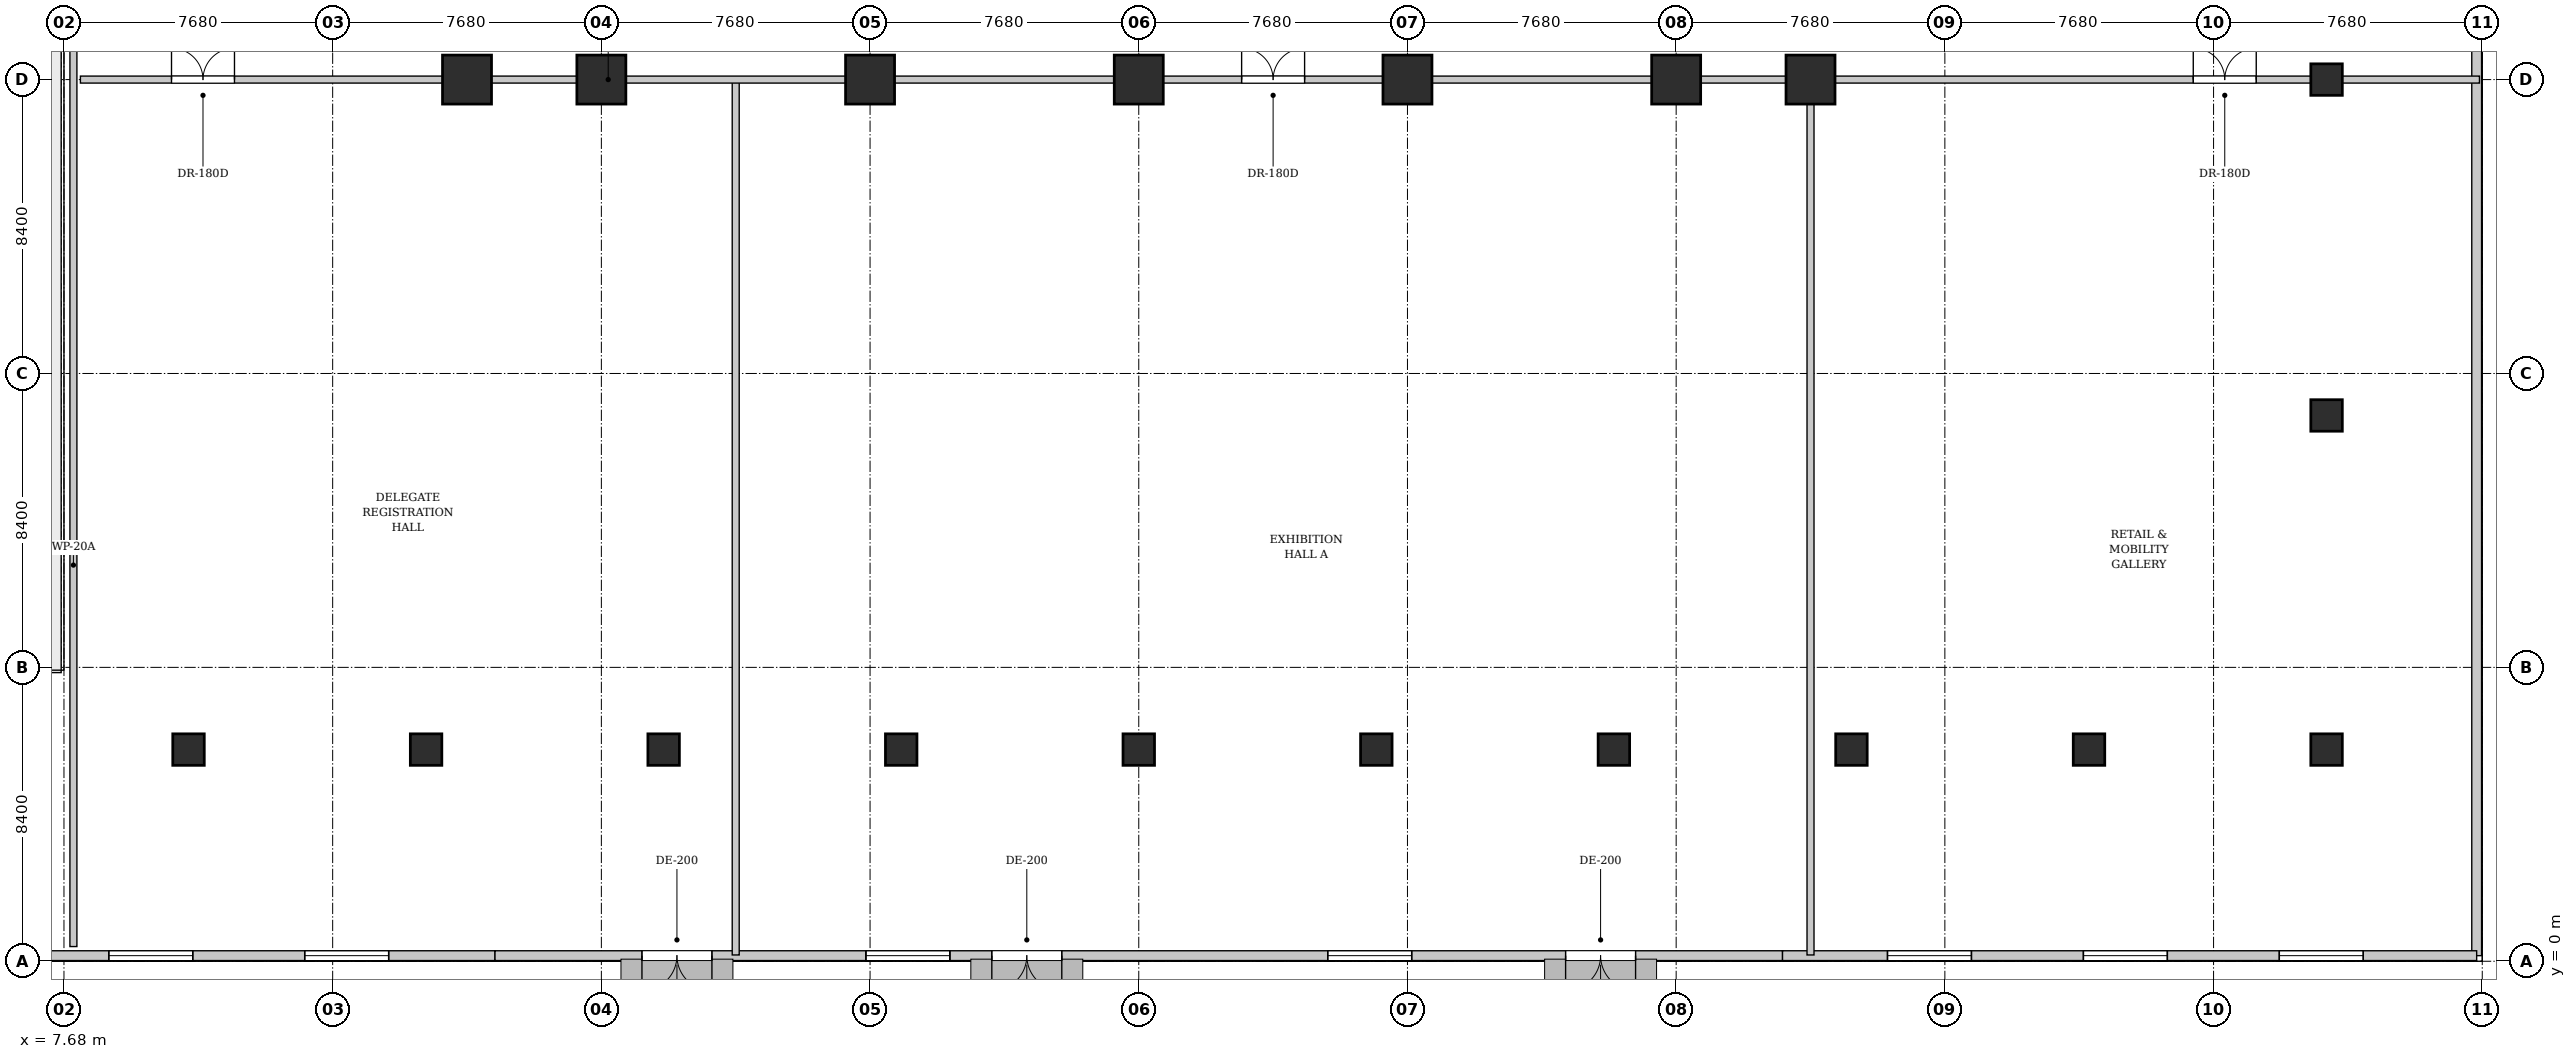
"""IFC4 building model, lengths in metres.
Left out: names, types, materials, properties, quantities, classifications, styles, units other than length and angle.
Written with IfcOpenShell. Run it as: python <this file> out.ifc"""

import sys

from ifc_helpers import new_model, si_unit, direction, frame, frame_2d, origin, origin_2d, place, context, subcontext, project, spatial, rectangle, extrude, element, fill, save


model = new_model("IFC4")
c1 = context("Model", 3, precision=1e-05, world=origin(), true_north=direction((0.0, 1.0)))
c2 = subcontext(c1, "Body", "Model", "MODEL_VIEW")
j1 = project(units=[si_unit("LENGTHUNIT", "METRE"), si_unit("PLANEANGLEUNIT", "RADIAN")], contexts=[c1])
p1 = place(None, origin())
s1 = spatial("IfcSite", under=j1, at=p1, CompositionType="ELEMENT")
p2 = place(p1, origin())
s2 = spatial("IfcBuilding", under=s1, at=p2, CompositionType="ELEMENT")
p3 = place(p2, origin())
s3 = spatial("IfcBuildingStorey", under=s2, at=p3, CompositionType="ELEMENT", Elevation=0.0)
for number, where, z_axis, x_axis in (
    (1, (23.04, 25.2, 0.0), (0.0, 0.0, 1.0), (1.0, 0.0, 0.0)),
    (2, (30.72, 25.2, 0.0), (0.0, 0.0, 1.0), (1.0, 0.0, 0.0)),
    (3, (38.4, 25.2, 0.0), (0.0, 0.0, 1.0), (1.0, 0.0, 0.0)),
    (4, (46.08, 25.2, 0.0), (0.0, 0.0, 1.0), (1.0, 0.0, 0.0)),
    (5, (53.76, 25.2, 0.0), (0.0, 0.0, 1.0), (1.0, 0.0, 0.0)),
    (6, (19.2, 25.2, 0.0), (0.0, 0.0, 1.0), (1.0, 0.0, 0.0)),
    (7, (57.6, 25.2, 0.0), (0.0, 0.0, 1.0), (1.0, 0.0, 0.0)),
):
    element("IfcColumn", number, at=place(p3, frame(where, z_axis=z_axis, x_axis=x_axis)), inside=s3, PredefinedType="COLUMN", context=c2, shape_type="SweptSolid", body=[
        extrude(rectangle(XDim=1.4, YDim=1.4, at=origin_2d()), origin(), (0.0, 0.0, 1.0), 5.2),
    ])
for number, where, z_axis, x_axis in (
    (8, (11.24, 6.05, 0.0), (0.0, 0.0, 1.0), (1.0, 0.0, 0.0)),
    (9, (18.03, 6.05, 0.0), (0.0, 0.0, 1.0), (1.0, 0.0, 0.0)),
    (10, (24.82, 6.05, 0.0), (0.0, 0.0, 1.0), (1.0, 0.0, 0.0)),
    (11, (31.61, 6.05, 0.0), (0.0, 0.0, 1.0), (1.0, 0.0, 0.0)),
    (12, (38.4, 6.05, 0.0), (0.0, 0.0, 1.0), (1.0, 0.0, 0.0)),
    (13, (45.19, 6.05, 0.0), (0.0, 0.0, 1.0), (1.0, 0.0, 0.0)),
    (14, (51.98, 6.05, 0.0), (0.0, 0.0, 1.0), (1.0, 0.0, 0.0)),
    (15, (58.77, 6.05, 0.0), (0.0, 0.0, 1.0), (1.0, 0.0, 0.0)),
    (16, (65.56, 6.05, 0.0), (0.0, 0.0, 1.0), (1.0, 0.0, 0.0)),
    (17, (72.35, 6.05, 0.0), (0.0, 0.0, 1.0), (1.0, 0.0, 0.0)),
    (18, (72.35, 15.6, 0.0), (0.0, 0.0, 1.0), (1.0, 0.0, 0.0)),
    (19, (72.35, 25.2, 0.0), (0.0, 0.0, 1.0), (1.0, 0.0, 0.0)),
):
    element("IfcColumn", number, at=place(p3, frame(where, z_axis=z_axis, x_axis=x_axis)), inside=s3, PredefinedType="COLUMN", context=c2, shape_type="SweptSolid", body=[
        extrude(rectangle(XDim=0.9, YDim=0.9, at=origin_2d()), origin(), (0.0, 0.0, 1.0), 5.2),
    ])
p4 = place(p3, frame((76.64, 50.24, 0.0), z_axis=(0.0, 0.0, 1.0), x_axis=(0.0, -1.0, 0.0)))
e20 = element("IfcWall", 20, at=p4, inside=s3, PredefinedType="SOLIDWALL", context=c2, shape_type="SweptSolid", body=[
    extrude(rectangle(XDim=50.08, YDim=0.28, at=frame_2d((25.04, 0.0))), origin(), (0.0, 0.0, 1.0), 4.94),
])
p5 = place(p4, frame((8.2, 0.0, 0.0)))
e21 = element("IfcOpeningElement", 21, at=p5, cuts=e20, PredefinedType="OPENING", context=c2, shape_type="SweptSolid", body=[
    extrude(rectangle(XDim=3.2, YDim=3.4, at=frame_2d((1.6, 1.7))), frame((0.0, 0.15, 0.0), z_axis=(0.0, -1.0, 0.0), x_axis=(1.0, 0.0, 0.0)), (0.0, 0.0, 1.0), 0.3),
])
p6 = place(p4, frame((18.6, 0.0, 0.0)))
e22 = element("IfcOpeningElement", 22, at=p6, cuts=e20, PredefinedType="OPENING", context=c2, shape_type="SweptSolid", body=[
    extrude(rectangle(XDim=3.2, YDim=3.4, at=frame_2d((1.6, 1.7))), frame((0.0, 0.15, 0.0), z_axis=(0.0, -1.0, 0.0), x_axis=(1.0, 0.0, 0.0)), (0.0, 0.0, 1.0), 0.3),
])
p7 = place(p3, frame((0.16, 0.16, 0.0), z_axis=(0.0, 0.0, 1.0), x_axis=(1.0, 0.0, 0.0)))
e23 = element("IfcWall", 23, at=p7, inside=s3, PredefinedType="SOLIDWALL", context=c2, shape_type="SweptSolid", body=[
    extrude(rectangle(XDim=19.84, YDim=0.28, at=frame_2d((9.92, 0.0))), origin(), (0.0, 0.0, 1.0), 4.94),
])
p8 = place(p7, frame((3.2, 0.0, 0.9)))
e24 = element("IfcOpeningElement", 24, at=p8, cuts=e23, PredefinedType="OPENING", context=c2, shape_type="SweptSolid", body=[
    extrude(rectangle(XDim=2.4, YDim=2.2, at=frame_2d((1.2, 1.1))), frame((0.0, 0.15, 0.0), z_axis=(0.0, -1.0, 0.0), x_axis=(1.0, 0.0, 0.0)), (0.0, 0.0, 1.0), 0.3),
])
p9 = place(p7, frame((8.8, 0.0, 0.9)))
e25 = element("IfcOpeningElement", 25, at=p9, cuts=e23, PredefinedType="OPENING", context=c2, shape_type="SweptSolid", body=[
    extrude(rectangle(XDim=2.4, YDim=2.2, at=frame_2d((1.2, 1.1))), frame((0.0, 0.15, 0.0), z_axis=(0.0, -1.0, 0.0), x_axis=(1.0, 0.0, 0.0)), (0.0, 0.0, 1.0), 0.3),
])
p10 = place(p7, frame((14.4, 0.0, 0.9)))
e26 = element("IfcOpeningElement", 26, at=p10, cuts=e23, PredefinedType="OPENING", context=c2, shape_type="SweptSolid", body=[
    extrude(rectangle(XDim=2.4, YDim=2.2, at=frame_2d((1.2, 1.1))), frame((0.0, 0.15, 0.0), z_axis=(0.0, -1.0, 0.0), x_axis=(1.0, 0.0, 0.0)), (0.0, 0.0, 1.0), 0.3),
])
p11 = place(p3, frame((20.0, 0.16, 0.0), z_axis=(0.0, 0.0, 1.0), x_axis=(1.0, 0.0, 0.0)))
e27 = element("IfcWall", 27, at=p11, inside=s3, PredefinedType="SOLIDWALL", context=c2, shape_type="SweptSolid", body=[
    extrude(rectangle(XDim=36.8, YDim=0.28, at=frame_2d((18.4, 0.0))), origin(), (0.0, 0.0, 1.0), 4.94),
])
p12 = place(p11, frame((4.2, 0.0, 0.0)))
e28 = element("IfcOpeningElement", 28, at=p12, cuts=e27, PredefinedType="OPENING", context=c2, shape_type="SweptSolid", body=[
    extrude(rectangle(XDim=2.0, YDim=2.5, at=frame_2d((1.0, 1.25))), frame((0.0, 0.15, 0.0), z_axis=(0.0, -1.0, 0.0), x_axis=(1.0, 0.0, 0.0)), (0.0, 0.0, 1.0), 0.3),
])
p13 = place(p11, frame((14.2, 0.0, 0.0)))
e29 = element("IfcOpeningElement", 29, at=p13, cuts=e27, PredefinedType="OPENING", context=c2, shape_type="SweptSolid", body=[
    extrude(rectangle(XDim=2.0, YDim=2.5, at=frame_2d((1.0, 1.25))), frame((0.0, 0.15, 0.0), z_axis=(0.0, -1.0, 0.0), x_axis=(1.0, 0.0, 0.0)), (0.0, 0.0, 1.0), 0.3),
])
p14 = place(p11, frame((30.6, 0.0, 0.0)))
e30 = element("IfcOpeningElement", 30, at=p14, cuts=e27, PredefinedType="OPENING", context=c2, shape_type="SweptSolid", body=[
    extrude(rectangle(XDim=2.0, YDim=2.5, at=frame_2d((1.0, 1.25))), frame((0.0, 0.15, 0.0), z_axis=(0.0, -1.0, 0.0), x_axis=(1.0, 0.0, 0.0)), (0.0, 0.0, 1.0), 0.3),
])
p15 = place(p11, frame((10.6, 0.0, 0.9)))
e31 = element("IfcOpeningElement", 31, at=p15, cuts=e27, PredefinedType="OPENING", context=c2, shape_type="SweptSolid", body=[
    extrude(rectangle(XDim=2.4, YDim=2.2, at=frame_2d((1.2, 1.1))), frame((0.0, 0.15, 0.0), z_axis=(0.0, -1.0, 0.0), x_axis=(1.0, 0.0, 0.0)), (0.0, 0.0, 1.0), 0.3),
])
p16 = place(p11, frame((23.8, 0.0, 0.9)))
e32 = element("IfcOpeningElement", 32, at=p16, cuts=e27, PredefinedType="OPENING", context=c2, shape_type="SweptSolid", body=[
    extrude(rectangle(XDim=2.4, YDim=2.2, at=frame_2d((1.2, 1.1))), frame((0.0, 0.15, 0.0), z_axis=(0.0, -1.0, 0.0), x_axis=(1.0, 0.0, 0.0)), (0.0, 0.0, 1.0), 0.3),
])
p17 = place(p3, frame((56.8, 0.16, 0.0), z_axis=(0.0, 0.0, 1.0), x_axis=(1.0, 0.0, 0.0)))
e33 = element("IfcWall", 33, at=p17, inside=s3, PredefinedType="SOLIDWALL", context=c2, shape_type="SweptSolid", body=[
    extrude(rectangle(XDim=19.84, YDim=0.28, at=frame_2d((9.92, 0.0))), origin(), (0.0, 0.0, 1.0), 4.94),
])
p18 = place(p17, frame((3.0, 0.0, 0.9)))
e34 = element("IfcOpeningElement", 34, at=p18, cuts=e33, PredefinedType="OPENING", context=c2, shape_type="SweptSolid", body=[
    extrude(rectangle(XDim=2.4, YDim=2.2, at=frame_2d((1.2, 1.1))), frame((0.0, 0.15, 0.0), z_axis=(0.0, -1.0, 0.0), x_axis=(1.0, 0.0, 0.0)), (0.0, 0.0, 1.0), 0.3),
])
p19 = place(p17, frame((8.6, 0.0, 0.9)))
e35 = element("IfcOpeningElement", 35, at=p19, cuts=e33, PredefinedType="OPENING", context=c2, shape_type="SweptSolid", body=[
    extrude(rectangle(XDim=2.4, YDim=2.2, at=frame_2d((1.2, 1.1))), frame((0.0, 0.15, 0.0), z_axis=(0.0, -1.0, 0.0), x_axis=(1.0, 0.0, 0.0)), (0.0, 0.0, 1.0), 0.3),
])
p20 = place(p17, frame((14.2, 0.0, 0.9)))
e36 = element("IfcOpeningElement", 36, at=p20, cuts=e33, PredefinedType="OPENING", context=c2, shape_type="SweptSolid", body=[
    extrude(rectangle(XDim=2.4, YDim=2.2, at=frame_2d((1.2, 1.1))), frame((0.0, 0.15, 0.0), z_axis=(0.0, -1.0, 0.0), x_axis=(1.0, 0.0, 0.0)), (0.0, 0.0, 1.0), 0.3),
])
p21 = place(p3, frame((7.95, 0.42, 0.0), z_axis=(0.0, 0.0, 1.0), x_axis=(0.0, 1.0, 0.0)))
e37 = element("IfcWall", 37, at=p21, inside=s3, PredefinedType="PARTITIONING", context=c2, shape_type="SweptSolid", body=[
    extrude(rectangle(XDim=49.56, YDim=0.2, at=frame_2d((24.78, 0.0))), origin(), (0.0, 0.0, 1.0), 4.94),
])
p22 = place(p21, frame((48.1, 0.0, 0.0)))
e38 = element("IfcOpeningElement", 38, at=p22, cuts=e37, PredefinedType="OPENING", context=c2, shape_type="SweptSolid", body=[
    extrude(rectangle(XDim=1.1, YDim=2.15, at=frame_2d((0.55, 1.075))), frame((0.0, 0.11, 0.0), z_axis=(0.0, -1.0, 0.0), x_axis=(1.0, 0.0, 0.0)), (0.0, 0.0, 1.0), 0.22),
])
p23 = place(p3, frame((26.88, 0.18, 0.0), z_axis=(0.0, 0.0, 1.0), x_axis=(0.0, 1.0, 0.0)))
e39 = element("IfcWall", 39, at=p23, inside=s3, PredefinedType="PARTITIONING", context=c2, shape_type="SweptSolid", body=[
    extrude(rectangle(XDim=25.02, YDim=0.2, at=frame_2d((12.51, 0.0))), origin(), (0.0, 0.0, 1.0), 4.94),
])
p24 = place(p3, frame((57.6, 0.18, 0.0), z_axis=(0.0, 0.0, 1.0), x_axis=(0.0, 1.0, 0.0)))
e40 = element("IfcWall", 40, at=p24, inside=s3, PredefinedType="PARTITIONING", context=c2, shape_type="SweptSolid", body=[
    extrude(rectangle(XDim=25.02, YDim=0.2, at=frame_2d((12.51, 0.0))), origin(), (0.0, 0.0, 1.0), 3.935),
])
p25 = place(p3, frame((8.15, 25.2, 0.0), z_axis=(0.0, 0.0, 1.0), x_axis=(1.0, 0.0, 0.0)))
e41 = element("IfcWall", 41, at=p25, inside=s3, PredefinedType="PARTITIONING", context=c2, shape_type="SweptSolid", body=[
    extrude(rectangle(XDim=68.57, YDim=0.2, at=frame_2d((34.285, 0.0))), origin(), (0.0, 0.0, 1.0), 3.935),
])
p26 = place(p25, frame((2.604, 0.0, 0.0)))
e42 = element("IfcOpeningElement", 42, at=p26, cuts=e41, PredefinedType="OPENING", context=c2, shape_type="SweptSolid", body=[
    extrude(rectangle(XDim=1.8, YDim=2.3, at=frame_2d((0.9, 1.15))), frame((0.0, 0.11, 0.0), z_axis=(0.0, -1.0, 0.0), x_axis=(1.0, 0.0, 0.0)), (0.0, 0.0, 1.0), 0.22),
])
p27 = place(p25, frame((33.19, 0.0, 0.0)))
e43 = element("IfcOpeningElement", 43, at=p27, cuts=e41, PredefinedType="OPENING", context=c2, shape_type="SweptSolid", body=[
    extrude(rectangle(XDim=1.8, YDim=2.3, at=frame_2d((0.9, 1.15))), frame((0.0, 0.11, 0.0), z_axis=(0.0, -1.0, 0.0), x_axis=(1.0, 0.0, 0.0)), (0.0, 0.0, 1.0), 0.22),
])
p28 = place(p25, frame((60.39, 0.0, 0.0)))
e44 = element("IfcOpeningElement", 44, at=p28, cuts=e41, PredefinedType="OPENING", context=c2, shape_type="SweptSolid", body=[
    extrude(rectangle(XDim=1.8, YDim=2.3, at=frame_2d((0.9, 1.15))), frame((0.0, 0.11, 0.0), z_axis=(0.0, -1.0, 0.0), x_axis=(1.0, 0.0, 0.0)), (0.0, 0.0, 1.0), 0.22),
])
p29 = place(p9, origin())
e45 = element("IfcWindow", 45, at=p29, inside=s3, PartitioningType="SINGLE_PANEL", PredefinedType="WINDOW", context=c2, shape_type="SweptSolid", body=[
    extrude(rectangle(XDim=2.4, YDim=2.2, at=frame_2d((1.2, 1.1))), frame((0.0, 0.03, 0.0), z_axis=(0.0, -1.0, 0.0), x_axis=(1.0, 0.0, 0.0)), (0.0, 0.0, 1.0), 0.06),
])
fill(e25, e45)
p30 = place(p10, origin())
e46 = element("IfcWindow", 46, at=p30, inside=s3, PartitioningType="SINGLE_PANEL", PredefinedType="WINDOW", context=c2, shape_type="SweptSolid", body=[
    extrude(rectangle(XDim=2.4, YDim=2.2, at=frame_2d((1.2, 1.1))), frame((0.0, 0.03, 0.0), z_axis=(0.0, -1.0, 0.0), x_axis=(1.0, 0.0, 0.0)), (0.0, 0.0, 1.0), 0.06),
])
fill(e26, e46)
p31 = place(p12, frame((2.0, 0.0, 0.0), z_axis=(0.0, 0.0, 1.0), x_axis=(-1.0, 0.0, 0.0)))
e47 = element("IfcDoor", 47, at=p31, inside=s3, OperationType="SINGLE_SWING_LEFT", PredefinedType="DOOR", context=c2, shape_type="SweptSolid", body=[
    extrude(rectangle(XDim=2.0, YDim=2.5, at=frame_2d((1.0, 1.25))), frame((0.0, 0.025, 0.0), z_axis=(0.0, -1.0, 0.0), x_axis=(1.0, 0.0, 0.0)), (0.0, 0.0, 1.0), 0.05),
])
fill(e28, e47)
p32 = place(p13, frame((2.0, 0.0, 0.0), z_axis=(0.0, 0.0, 1.0), x_axis=(-1.0, 0.0, 0.0)))
e48 = element("IfcDoor", 48, at=p32, inside=s3, OperationType="SINGLE_SWING_LEFT", PredefinedType="DOOR", context=c2, shape_type="SweptSolid", body=[
    extrude(rectangle(XDim=2.0, YDim=2.5, at=frame_2d((1.0, 1.25))), frame((0.0, 0.025, 0.0), z_axis=(0.0, -1.0, 0.0), x_axis=(1.0, 0.0, 0.0)), (0.0, 0.0, 1.0), 0.05),
])
fill(e29, e48)
p33 = place(p14, frame((2.0, 0.0, 0.0), z_axis=(0.0, 0.0, 1.0), x_axis=(-1.0, 0.0, 0.0)))
e49 = element("IfcDoor", 49, at=p33, inside=s3, OperationType="SINGLE_SWING_LEFT", PredefinedType="DOOR", context=c2, shape_type="SweptSolid", body=[
    extrude(rectangle(XDim=2.0, YDim=2.5, at=frame_2d((1.0, 1.25))), frame((0.0, 0.025, 0.0), z_axis=(0.0, -1.0, 0.0), x_axis=(1.0, 0.0, 0.0)), (0.0, 0.0, 1.0), 0.05),
])
fill(e30, e49)
p34 = place(p15, origin())
e50 = element("IfcWindow", 50, at=p34, inside=s3, PartitioningType="SINGLE_PANEL", PredefinedType="WINDOW", context=c2, shape_type="SweptSolid", body=[
    extrude(rectangle(XDim=2.4, YDim=2.2, at=frame_2d((1.2, 1.1))), frame((0.0, 0.03, 0.0), z_axis=(0.0, -1.0, 0.0), x_axis=(1.0, 0.0, 0.0)), (0.0, 0.0, 1.0), 0.06),
])
fill(e31, e50)
p35 = place(p16, origin())
e51 = element("IfcWindow", 51, at=p35, inside=s3, PartitioningType="SINGLE_PANEL", PredefinedType="WINDOW", context=c2, shape_type="SweptSolid", body=[
    extrude(rectangle(XDim=2.4, YDim=2.2, at=frame_2d((1.2, 1.1))), frame((0.0, 0.03, 0.0), z_axis=(0.0, -1.0, 0.0), x_axis=(1.0, 0.0, 0.0)), (0.0, 0.0, 1.0), 0.06),
])
fill(e32, e51)
p36 = place(p18, origin())
e52 = element("IfcWindow", 52, at=p36, inside=s3, PartitioningType="SINGLE_PANEL", PredefinedType="WINDOW", context=c2, shape_type="SweptSolid", body=[
    extrude(rectangle(XDim=2.4, YDim=2.2, at=frame_2d((1.2, 1.1))), frame((0.0, 0.03, 0.0), z_axis=(0.0, -1.0, 0.0), x_axis=(1.0, 0.0, 0.0)), (0.0, 0.0, 1.0), 0.06),
])
fill(e34, e52)
p37 = place(p19, origin())
e53 = element("IfcWindow", 53, at=p37, inside=s3, PartitioningType="SINGLE_PANEL", PredefinedType="WINDOW", context=c2, shape_type="SweptSolid", body=[
    extrude(rectangle(XDim=2.4, YDim=2.2, at=frame_2d((1.2, 1.1))), frame((0.0, 0.03, 0.0), z_axis=(0.0, -1.0, 0.0), x_axis=(1.0, 0.0, 0.0)), (0.0, 0.0, 1.0), 0.06),
])
fill(e35, e53)
p38 = place(p20, origin())
e54 = element("IfcWindow", 54, at=p38, inside=s3, PartitioningType="SINGLE_PANEL", PredefinedType="WINDOW", context=c2, shape_type="SweptSolid", body=[
    extrude(rectangle(XDim=2.4, YDim=2.2, at=frame_2d((1.2, 1.1))), frame((0.0, 0.03, 0.0), z_axis=(0.0, -1.0, 0.0), x_axis=(1.0, 0.0, 0.0)), (0.0, 0.0, 1.0), 0.06),
])
fill(e36, e54)
p39 = place(p26, origin())
e55 = element("IfcDoor", 55, at=p39, inside=s3, OperationType="DOUBLE_DOOR_SINGLE_SWING", PredefinedType="DOOR", context=c2, shape_type="SweptSolid", body=[
    extrude(rectangle(XDim=1.8, YDim=2.3, at=frame_2d((0.9, 1.15))), frame((0.0, 0.025, 0.0), z_axis=(0.0, -1.0, 0.0), x_axis=(1.0, 0.0, 0.0)), (0.0, 0.0, 1.0), 0.05),
])
fill(e42, e55)
p40 = place(p27, origin())
e56 = element("IfcDoor", 56, at=p40, inside=s3, OperationType="DOUBLE_DOOR_SINGLE_SWING", PredefinedType="DOOR", context=c2, shape_type="SweptSolid", body=[
    extrude(rectangle(XDim=1.8, YDim=2.3, at=frame_2d((0.9, 1.15))), frame((0.0, 0.025, 0.0), z_axis=(0.0, -1.0, 0.0), x_axis=(1.0, 0.0, 0.0)), (0.0, 0.0, 1.0), 0.05),
])
fill(e43, e56)
p41 = place(p28, origin())
e57 = element("IfcDoor", 57, at=p41, inside=s3, OperationType="DOUBLE_DOOR_SINGLE_SWING", PredefinedType="DOOR", context=c2, shape_type="SweptSolid", body=[
    extrude(rectangle(XDim=1.8, YDim=2.3, at=frame_2d((0.9, 1.15))), frame((0.0, 0.025, 0.0), z_axis=(0.0, -1.0, 0.0), x_axis=(1.0, 0.0, 0.0)), (0.0, 0.0, 1.0), 0.05),
])
fill(e44, e57)
save(model, sys.argv[1])
